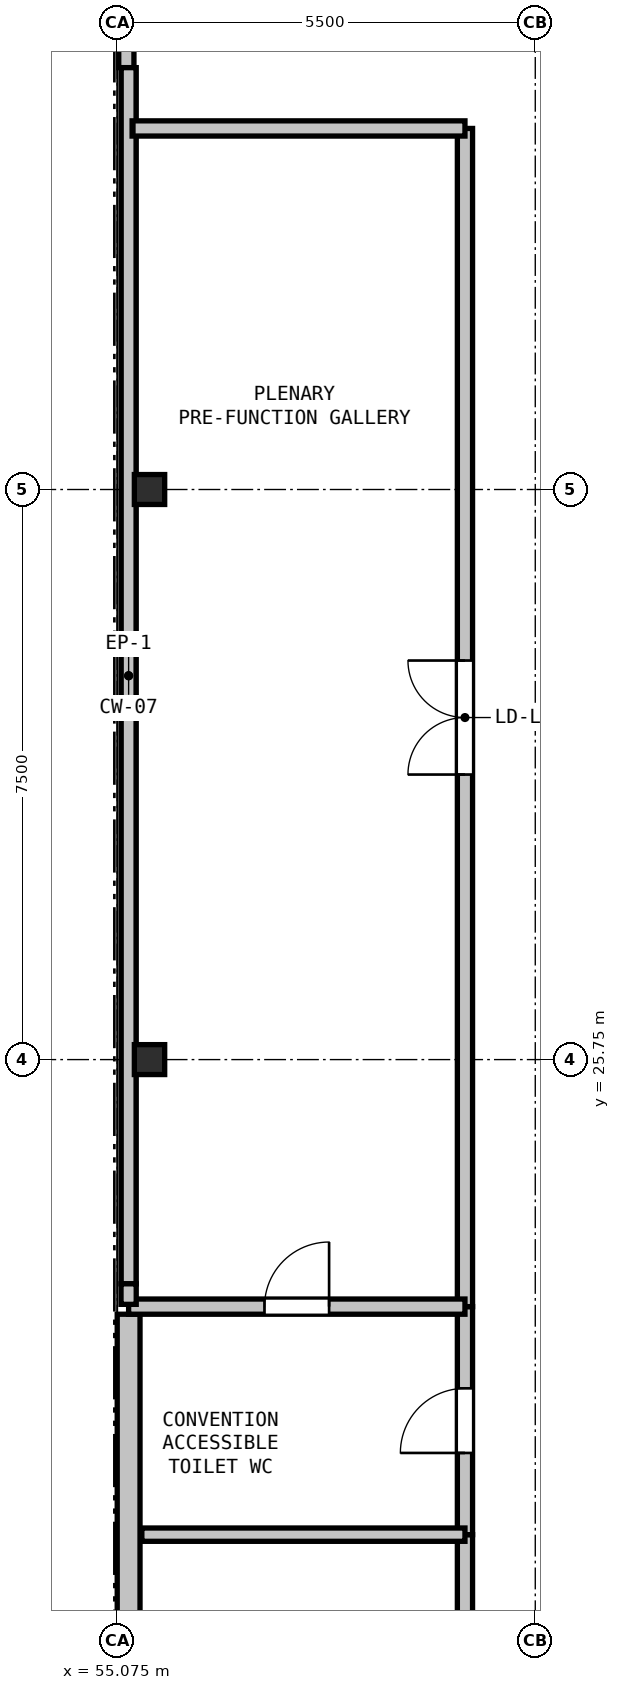
"""IFC4 building model, lengths in metres.
Left out: names, types, materials, properties, quantities, classifications, styles, units other than length and angle.
Written with IfcOpenShell. Run it as: python <this file> out.ifc"""

import sys

from ifc_helpers import new_model, si_unit, direction, frame, frame_2d, origin, origin_2d, place, context, subcontext, project, spatial, rectangle, i_section, extrude, element, fill, save


model = new_model("IFC4")
c1 = context("Model", 3, precision=1e-05, world=origin(), true_north=direction((0.0, 1.0)))
c2 = subcontext(c1, "Body", "Model", "MODEL_VIEW")
j1 = project(units=[si_unit("LENGTHUNIT", "METRE"), si_unit("PLANEANGLEUNIT", "RADIAN")], contexts=[c1])
p1 = place(None, origin())
s1 = spatial("IfcSite", under=j1, at=p1, CompositionType="ELEMENT")
p2 = place(p1, origin())
s2 = spatial("IfcBuilding", under=s1, at=p2, CompositionType="ELEMENT")
p3 = place(p2, frame((0.0, 0.0, 9.6)))
s3 = spatial("IfcBuildingStorey", under=s2, at=p3, CompositionType="ELEMENT", Elevation=9.6)
for number, where, z_axis, x_axis in (
    (1, (55.5, 25.75, 0.0), (0.0, 0.0, 1.0), (1.0, 0.0, 0.0)),
    (2, (55.5, 33.25, 0.0), (0.0, 0.0, 1.0), (1.0, 0.0, 0.0)),
):
    element("IfcColumn", number, at=place(p3, frame(where, z_axis=z_axis, x_axis=x_axis)), inside=s3, PredefinedType="COLUMN", context=c2, shape_type="SweptSolid", body=[
        extrude(i_section(OverallWidth=0.399, OverallDepth=0.394, WebThickness=0.023, FlangeThickness=0.037, at=origin_2d()), origin(), (0.0, 0.0, 1.0), 4.8),
    ])
p4 = place(p3, frame((55.195, 38.8, 0.0), z_axis=(0.0, 0.0, 1.0), x_axis=(0.0, 1.0, 0.0)))
e3 = element("IfcWall", 3, at=p4, inside=s3, PredefinedType="PARAPET", context=c2, shape_type="SweptSolid", body=[
    extrude(rectangle(XDim=9.45, YDim=0.2, at=frame_2d((4.725, 0.0))), origin(), (0.0, 0.0, 1.0), 4.09),
])
p5 = place(p3, frame((55.225, 11.45, 0.0), z_axis=(0.0, 0.0, 1.0), x_axis=(0.0, 1.0, 0.0)))
e4 = element("IfcWall", 4, at=p5, inside=s3, PredefinedType="SOLIDWALL", context=c2, shape_type="SweptSolid", body=[
    extrude(rectangle(XDim=10.95, YDim=0.3, at=frame_2d((5.475, 0.0))), origin(), (0.0, 0.0, 1.0), 4.09),
])
p6 = place(p3, frame((55.225, 22.8, 0.0), z_axis=(0.0, 0.0, 1.0), x_axis=(0.0, 1.0, 0.0)))
e5 = element("IfcWall", 5, at=p6, inside=s3, PredefinedType="PARAPET", context=c2, shape_type="SweptSolid", body=[
    extrude(rectangle(XDim=16.0, YDim=0.2, at=frame_2d((8.0, 0.0))), origin(), (0.0, 0.0, 1.0), 0.2),
])
p7 = place(p3, frame((59.65, 16.5, 0.0), z_axis=(0.0, 0.0, 1.0), x_axis=(0.0, 1.0, 0.0)))
e6 = element("IfcWall", 6, at=p7, inside=s3, PredefinedType="PARTITIONING", context=c2, shape_type="SweptSolid", body=[
    extrude(rectangle(XDim=3.0, YDim=0.2, at=frame_2d((1.5, 0.0))), origin(), (0.0, 0.0, 1.0), 3.614),
])
p8 = place(p7, frame((1.075, 0.0, 0.0)))
e7 = element("IfcOpeningElement", 7, at=p8, cuts=e6, PredefinedType="OPENING", context=c2, shape_type="SweptSolid", body=[
    extrude(rectangle(XDim=0.85, YDim=2.1, at=frame_2d((0.425, 1.05))), frame((0.0, 0.11, 0.0), z_axis=(0.0, -1.0, 0.0), x_axis=(1.0, 0.0, 0.0)), (0.0, 0.0, 1.0), 0.22),
])
p9 = place(p3, frame((59.65, 19.5, 0.0), z_axis=(0.0, 0.0, 1.0), x_axis=(0.0, 1.0, 0.0)))
e8 = element("IfcWall", 8, at=p9, inside=s3, PredefinedType="PARTITIONING", context=c2, shape_type="SweptSolid", body=[
    extrude(rectangle(XDim=3.0, YDim=0.2, at=frame_2d((1.5, 0.0))), origin(), (0.0, 0.0, 1.0), 4.48),
])
p10 = place(p9, frame((1.075, 0.0, 0.0)))
e9 = element("IfcOpeningElement", 9, at=p10, cuts=e8, PredefinedType="OPENING", context=c2, shape_type="SweptSolid", body=[
    extrude(rectangle(XDim=0.85, YDim=2.1, at=frame_2d((0.425, 1.05))), frame((0.0, 0.11, 0.0), z_axis=(0.0, -1.0, 0.0), x_axis=(1.0, 0.0, 0.0)), (0.0, 0.0, 1.0), 0.22),
])
p11 = place(p3, frame((59.65, 22.5, 0.0), z_axis=(0.0, 0.0, 1.0), x_axis=(0.0, 1.0, 0.0)))
e10 = element("IfcWall", 10, at=p11, inside=s3, PredefinedType="PARTITIONING", context=c2, shape_type="SweptSolid", body=[
    extrude(rectangle(XDim=15.5, YDim=0.2, at=frame_2d((7.75, 0.0))), origin(), (0.0, 0.0, 1.0), 3.614),
])
p12 = place(p11, frame((7.0, 0.0, 0.0)))
e11 = element("IfcOpeningElement", 11, at=p12, cuts=e10, PredefinedType="OPENING", context=c2, shape_type="SweptSolid", body=[
    extrude(rectangle(XDim=1.5, YDim=2.2, at=frame_2d((0.75, 1.1))), frame((0.0, 0.11, 0.0), z_axis=(0.0, -1.0, 0.0), x_axis=(1.0, 0.0, 0.0)), (0.0, 0.0, 1.0), 0.22),
])
p13 = place(p3, frame((59.65, 38.0, 0.0), z_axis=(0.0, 0.0, 1.0), x_axis=(-1.0, 0.0, 0.0)))
e12 = element("IfcWall", 12, at=p13, inside=s3, PredefinedType="PARTITIONING", context=c2, shape_type="SweptSolid", body=[
    extrude(rectangle(XDim=4.379, YDim=0.2, at=frame_2d((2.189, 0.0))), origin(), (0.0, 0.0, 1.0), 4.09),
])
p14 = place(p3, frame((55.399, 19.5, 0.0), z_axis=(0.0, 0.0, 1.0), x_axis=(1.0, 0.0, 0.0)))
e13 = element("IfcWall", 13, at=p14, inside=s3, PredefinedType="PLUMBINGWALL", context=c2, shape_type="SweptSolid", body=[
    extrude(rectangle(XDim=4.251, YDim=0.175, at=frame_2d((2.125, 0.0))), origin(), (0.0, 0.0, 1.0), 4.09),
])
p15 = place(p3, frame((55.225, 22.5, 0.0), z_axis=(0.0, 0.0, 1.0), x_axis=(1.0, 0.0, 0.0)))
e14 = element("IfcWall", 14, at=p15, inside=s3, PredefinedType="PARTITIONING", context=c2, shape_type="SweptSolid", body=[
    extrude(rectangle(XDim=4.425, YDim=0.2, at=frame_2d((2.212, 0.0))), origin(), (0.0, 0.0, 1.0), 4.09),
])
p16 = place(p15, frame((1.788, 0.0, 0.0)))
e15 = element("IfcOpeningElement", 15, at=p16, cuts=e14, PredefinedType="OPENING", context=c2, shape_type="SweptSolid", body=[
    extrude(rectangle(XDim=0.85, YDim=2.1, at=frame_2d((0.425, 1.05))), frame((0.0, 0.11, 0.0), z_axis=(0.0, -1.0, 0.0), x_axis=(1.0, 0.0, 0.0)), (0.0, 0.0, 1.0), 0.22),
])
p17 = place(p3, frame((55.225, 22.53, 0.0), z_axis=(0.0, 0.0, 1.0), x_axis=(0.0, 1.0, 0.0)))
e16 = element("IfcWall", 16, at=p17, inside=s3, PredefinedType="PARTITIONING", context=c2, shape_type="SweptSolid", body=[
    extrude(rectangle(XDim=0.27, YDim=0.2, at=frame_2d((0.135, 0.0))), origin(), (0.0, 0.0, 1.0), 4.09),
])
p18 = place(p10, origin())
e17 = element("IfcDoor", 17, at=p18, inside=s3, OperationType="SINGLE_SWING_LEFT", PredefinedType="DOOR", context=c2, shape_type="SweptSolid", body=[
    extrude(rectangle(XDim=0.85, YDim=2.1, at=frame_2d((0.425, 1.05))), frame((0.0, 0.025, 0.0), z_axis=(0.0, -1.0, 0.0), x_axis=(1.0, 0.0, 0.0)), (0.0, 0.0, 1.0), 0.05),
])
fill(e9, e17)
p19 = place(p12, origin())
e18 = element("IfcDoor", 18, at=p19, inside=s3, OperationType="DOUBLE_DOOR_SINGLE_SWING", PredefinedType="DOOR", context=c2, shape_type="SweptSolid", body=[
    extrude(rectangle(XDim=1.5, YDim=2.2, at=frame_2d((0.75, 1.1))), frame((0.0, 0.025, 0.0), z_axis=(0.0, -1.0, 0.0), x_axis=(1.0, 0.0, 0.0)), (0.0, 0.0, 1.0), 0.05),
])
fill(e11, e18)
p20 = place(p16, origin())
e19 = element("IfcDoor", 19, at=p20, inside=s3, OperationType="SINGLE_SWING_RIGHT", PredefinedType="DOOR", context=c2, shape_type="SweptSolid", body=[
    extrude(rectangle(XDim=0.85, YDim=2.1, at=frame_2d((0.425, 1.05))), frame((0.0, 0.025, 0.0), z_axis=(0.0, -1.0, 0.0), x_axis=(1.0, 0.0, 0.0)), (0.0, 0.0, 1.0), 0.05),
])
fill(e15, e19)
save(model, sys.argv[1])
